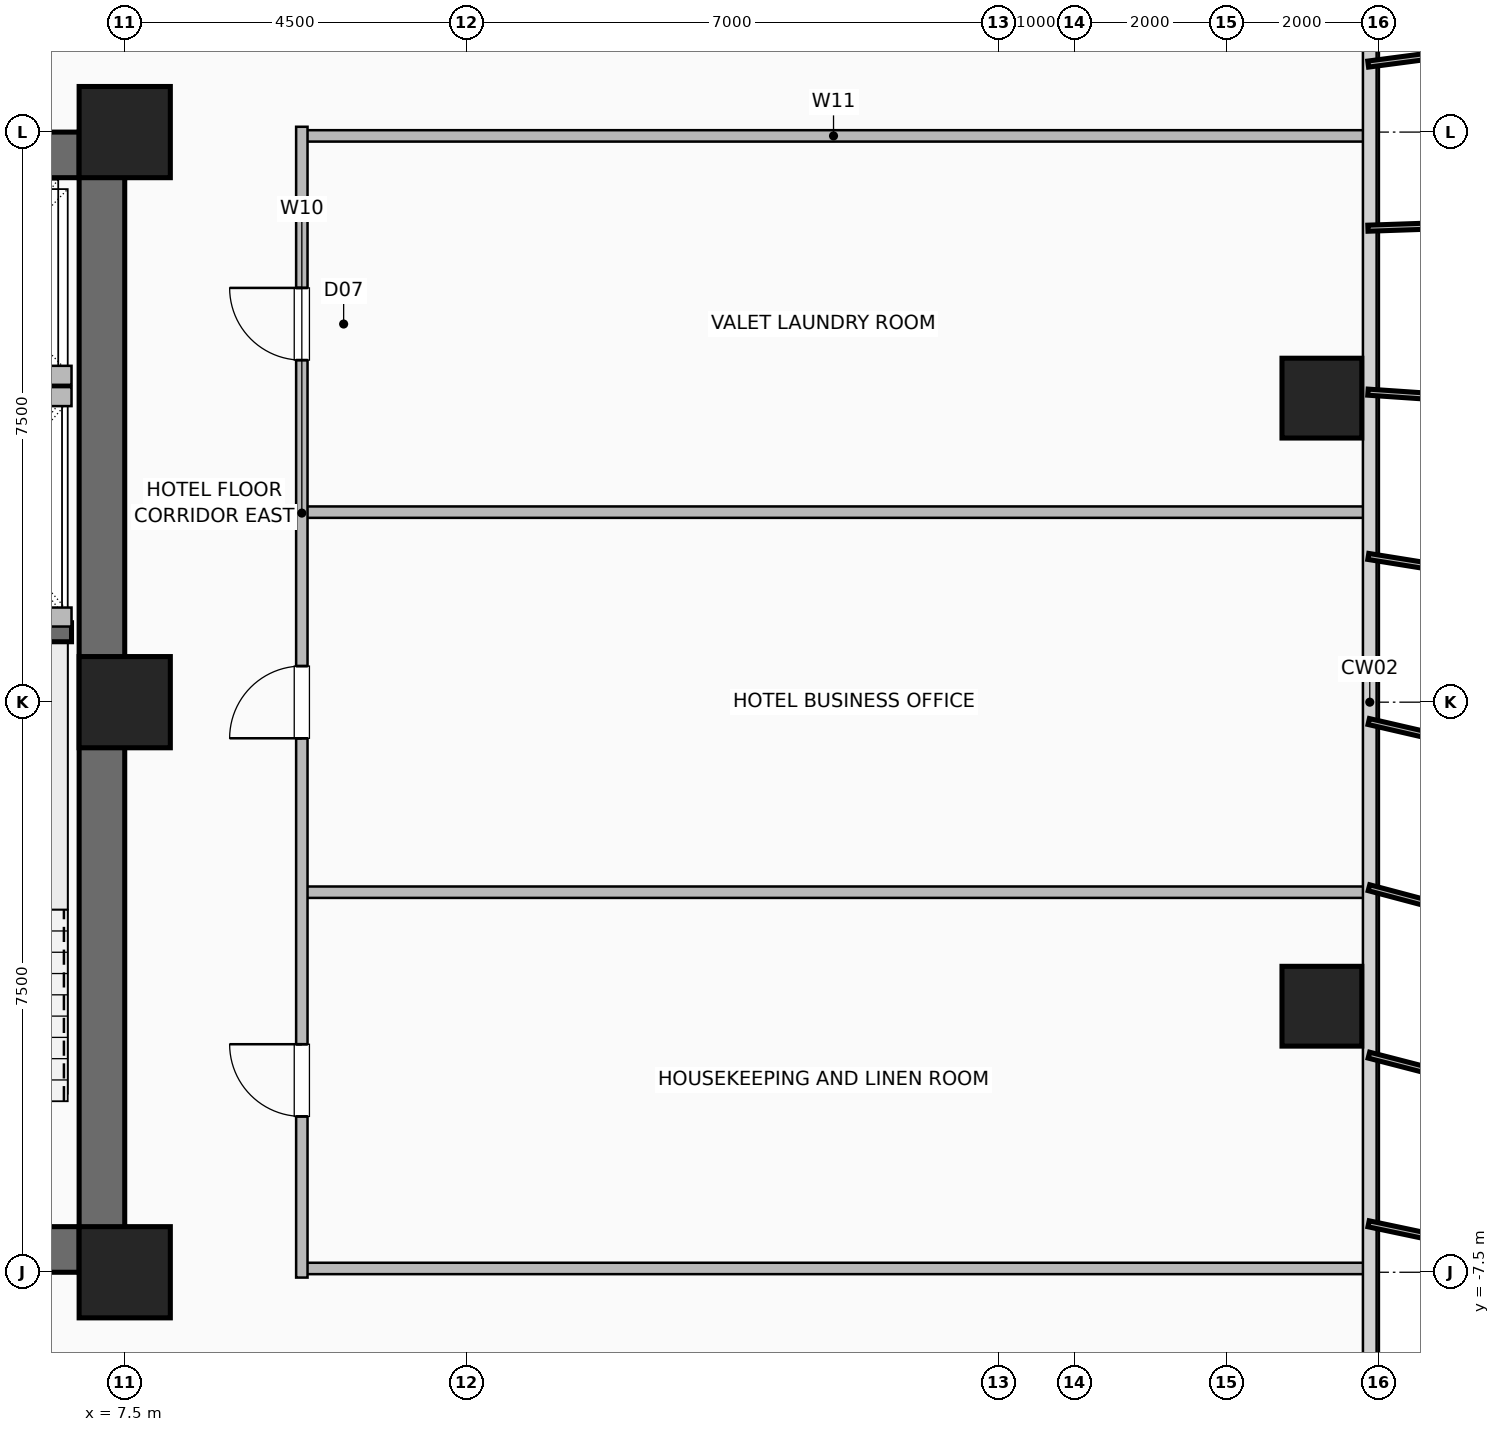
"""IFC4 building model, lengths in metres.
Left out: names, types, materials, properties, quantities, classifications, styles, units other than length and angle.
Written with IfcOpenShell. Run it as: python <this file> out.ifc"""

import sys

from ifc_helpers import new_model, si_unit, direction, frame, frame_2d, origin, origin_2d, place, context, subcontext, project, spatial, rectangle, hollow_rectangle, extrude, element, fill, save


model = new_model("IFC4")
c1 = context("Model", 3, precision=1e-05, world=origin(), true_north=direction((0.0, 1.0)))
c2 = subcontext(c1, "Body", "Model", "MODEL_VIEW")
j1 = project(units=[si_unit("LENGTHUNIT", "METRE"), si_unit("PLANEANGLEUNIT", "RADIAN")], contexts=[c1])
p1 = place(None, origin())
s1 = spatial("IfcSite", under=j1, at=p1, CompositionType="ELEMENT")
p2 = place(p1, origin())
s2 = spatial("IfcBuilding", under=s1, at=p2, CompositionType="ELEMENT")
p3 = place(p2, frame((0.0, 0.0, 37.5)))
s3 = spatial("IfcBuildingStorey", under=s2, at=p3, CompositionType="ELEMENT", Elevation=37.5)
for number, where, z_axis, x_axis in (
    (1, (7.5, -7.5, 0.0), (0.0, 0.0, 1.0), (1.0, 0.0, 0.0)),
    (2, (7.5, 0.0, 0.0), (0.0, 0.0, 1.0), (1.0, 0.0, 0.0)),
    (3, (7.5, 7.5, 0.0), (0.0, 0.0, 1.0), (1.0, 0.0, 0.0)),
):
    element("IfcColumn", number, at=place(p3, frame(where, z_axis=z_axis, x_axis=x_axis)), inside=s3, PredefinedType="COLUMN", context=c2, shape_type="SweptSolid", body=[
        extrude(hollow_rectangle(XDim=1.2, YDim=1.2, WallThickness=0.055, at=origin_2d()), origin(), (0.0, 0.0, 1.0), 3.5),
    ])
for number, where, z_axis, x_axis in (
    (4, (23.25, -4.0, 0.0), (0.0, 0.0, 1.0), (1.0, 0.0, 0.0)),
    (5, (23.25, 4.0, 0.0), (0.0, 0.0, 1.0), (1.0, 0.0, 0.0)),
):
    element("IfcColumn", number, at=place(p3, frame(where, z_axis=z_axis, x_axis=x_axis)), inside=s3, PredefinedType="COLUMN", context=c2, shape_type="SweptSolid", body=[
        extrude(hollow_rectangle(XDim=1.05, YDim=1.05, WallThickness=0.05, at=origin_2d()), origin(), (0.0, 0.0, 1.0), 3.5),
    ])
p4 = place(p3, frame((-7.5, -7.2, 0.0), z_axis=(0.0, 0.0, 1.0), x_axis=(1.0, 0.0, 0.0)))
e6 = element("IfcWall", 6, at=p4, inside=s3, PredefinedType="SHEAR", context=c2, shape_type="SweptSolid", body=[
    extrude(rectangle(XDim=15.0, YDim=0.6, at=frame_2d((7.5, 0.0))), origin(), (0.0, 0.0, 1.0), 3.25),
])
p5 = place(p4, frame((1.55, 0.0, 0.0)))
e7 = element("IfcOpeningElement", 7, at=p5, cuts=e6, PredefinedType="OPENING", context=c2, shape_type="SweptSolid", body=[
    extrude(rectangle(XDim=1.05, YDim=2.08, at=frame_2d((0.525, 1.04))), frame((0.0, 0.31, 0.0), z_axis=(0.0, -1.0, 0.0), x_axis=(1.0, 0.0, 0.0)), (0.0, 0.0, 1.0), 0.62),
])
p6 = place(p4, frame((12.4, 0.0, 0.0)))
e8 = element("IfcOpeningElement", 8, at=p6, cuts=e6, PredefinedType="OPENING", context=c2, shape_type="SweptSolid", body=[
    extrude(rectangle(XDim=1.05, YDim=2.08, at=frame_2d((0.525, 1.04))), frame((0.0, 0.31, 0.0), z_axis=(0.0, -1.0, 0.0), x_axis=(1.0, 0.0, 0.0)), (0.0, 0.0, 1.0), 0.62),
])
p7 = place(p4, frame((4.64, 0.0, 0.0)))
e9 = element("IfcOpeningElement", 9, at=p7, cuts=e6, PredefinedType="OPENING", context=c2, shape_type="SweptSolid", body=[
    extrude(rectangle(XDim=1.1, YDim=2.2, at=frame_2d((0.55, 1.1))), frame((0.0, 0.31, 0.0), z_axis=(0.0, -1.0, 0.0), x_axis=(1.0, 0.0, 0.0)), (0.0, 0.0, 1.0), 0.62),
])
p8 = place(p4, frame((6.52, 0.0, 0.0)))
e10 = element("IfcOpeningElement", 10, at=p8, cuts=e6, PredefinedType="OPENING", context=c2, shape_type="SweptSolid", body=[
    extrude(rectangle(XDim=1.1, YDim=2.2, at=frame_2d((0.55, 1.1))), frame((0.0, 0.31, 0.0), z_axis=(0.0, -1.0, 0.0), x_axis=(1.0, 0.0, 0.0)), (0.0, 0.0, 1.0), 0.62),
])
p9 = place(p4, frame((8.4, 0.0, 0.0)))
e11 = element("IfcOpeningElement", 11, at=p9, cuts=e6, PredefinedType="OPENING", context=c2, shape_type="SweptSolid", body=[
    extrude(rectangle(XDim=1.1, YDim=2.2, at=frame_2d((0.55, 1.1))), frame((0.0, 0.31, 0.0), z_axis=(0.0, -1.0, 0.0), x_axis=(1.0, 0.0, 0.0)), (0.0, 0.0, 1.0), 0.62),
])
for number, where, z_axis, x_axis in (
    (12, (-7.5, 7.2, 0.0), (0.0, 0.0, 1.0), (1.0, 0.0, 0.0)),
    (13, (7.2, -7.5, 0.0), (0.0, 0.0, 1.0), (0.0, 1.0, 0.0)),
):
    element("IfcWall", number, at=place(p3, frame(where, z_axis=z_axis, x_axis=x_axis)), inside=s3, PredefinedType="SHEAR", context=c2, shape_type="SweptSolid", body=[
        extrude(rectangle(XDim=15.0, YDim=0.6, at=frame_2d((7.5, 0.0))), origin(), (0.0, 0.0, 1.0), 3.25),
    ])
p10 = place(p3, frame((3.47, 0.92, 0.0), z_axis=(0.0, 0.0, 1.0), x_axis=(1.0, 0.0, 0.0)))
e14 = element("IfcWall", 14, at=p10, inside=s3, PredefinedType="SHEAR", context=c2, shape_type="SweptSolid", body=[
    extrude(rectangle(XDim=3.33, YDim=0.25, at=frame_2d((1.665, 0.0))), origin(), (0.0, 0.0, 1.0), 3.25),
])
p11 = place(p3, frame((4.38, 4.3, 0.0), z_axis=(0.0, 0.0, 1.0), x_axis=(1.0, 0.0, 0.0)))
e15 = element("IfcWall", 15, at=p11, inside=s3, PredefinedType="SHEAR", context=c2, shape_type="SweptSolid", body=[
    extrude(rectangle(XDim=2.42, YDim=0.25, at=frame_2d((1.21, 0.0))), origin(), (0.0, 0.0, 1.0), 3.25),
])
for number, where, z_axis, x_axis in (
    (16, (4.28, 1.12, 0.0), (0.0, 0.0, 1.0), (1.0, 0.0, 0.0)),
    (17, (4.28, 4.02, 0.0), (0.0, 0.0, 1.0), (1.0, 0.0, 0.0)),
):
    element("IfcWall", number, at=place(p3, frame(where, z_axis=z_axis, x_axis=x_axis)), inside=s3, PredefinedType="SHEAR", context=c2, shape_type="SweptSolid", body=[
        extrude(rectangle(XDim=2.52, YDim=0.25, at=frame_2d((1.26, 0.0))), origin(), (0.0, 0.0, 1.0), 3.25),
    ])
for number, where, z_axis, x_axis in (
    (18, (9.83, -7.45, 0.0), (0.0, 0.0, 1.0), (1.0, 0.0, 0.0)),
    (19, (9.83, -2.5, 0.0), (0.0, 0.0, 1.0), (1.0, 0.0, 0.0)),
    (20, (9.83, 2.5, 0.0), (0.0, 0.0, 1.0), (1.0, 0.0, 0.0)),
    (21, (9.83, 7.45, 0.0), (0.0, 0.0, 1.0), (1.0, 0.0, 0.0)),
):
    element("IfcWall", number, at=place(p3, frame(where, z_axis=z_axis, x_axis=x_axis)), inside=s3, PredefinedType="PARTITIONING", context=c2, shape_type="SweptSolid", body=[
        extrude(rectangle(XDim=13.99, YDim=0.15, at=frame_2d((6.995, 0.0))), origin(), (0.0, 0.0, 1.0), 3.25),
    ])
p12 = place(p3, frame((9.83, -7.57, 0.0), z_axis=(0.0, 0.0, 1.0), x_axis=(0.0, 1.0, 0.0)))
e22 = element("IfcWall", 22, at=p12, inside=s3, PredefinedType="PARTITIONING", context=c2, shape_type="SweptSolid", body=[
    extrude(rectangle(XDim=15.14, YDim=0.15, at=frame_2d((7.57, 0.0))), origin(), (0.0, 0.0, 1.0), 3.25),
])
p13 = place(p12, frame((2.12, 0.0, 0.0)))
e23 = element("IfcOpeningElement", 23, at=p13, cuts=e22, PredefinedType="OPENING", context=c2, shape_type="SweptSolid", body=[
    extrude(rectangle(XDim=0.95, YDim=2.06, at=frame_2d((0.475, 1.03))), frame((0.0, 0.085, 0.0), z_axis=(0.0, -1.0, 0.0), x_axis=(1.0, 0.0, 0.0)), (0.0, 0.0, 1.0), 0.17),
])
p14 = place(p12, frame((7.095, 0.0, 0.0)))
e24 = element("IfcOpeningElement", 24, at=p14, cuts=e22, PredefinedType="OPENING", context=c2, shape_type="SweptSolid", body=[
    extrude(rectangle(XDim=0.95, YDim=2.06, at=frame_2d((0.475, 1.03))), frame((0.0, 0.085, 0.0), z_axis=(0.0, -1.0, 0.0), x_axis=(1.0, 0.0, 0.0)), (0.0, 0.0, 1.0), 0.17),
])
p15 = place(p12, frame((12.07, 0.0, 0.0)))
e25 = element("IfcOpeningElement", 25, at=p15, cuts=e22, PredefinedType="OPENING", context=c2, shape_type="SweptSolid", body=[
    extrude(rectangle(XDim=0.95, YDim=2.06, at=frame_2d((0.475, 1.03))), frame((0.0, 0.085, 0.0), z_axis=(0.0, -1.0, 0.0), x_axis=(1.0, 0.0, 0.0)), (0.0, 0.0, 1.0), 0.17),
])
p16 = place(p13, origin())
e26 = element("IfcDoor", 26, at=p16, inside=s3, OperationType="SINGLE_SWING_RIGHT", PredefinedType="DOOR", context=c2, shape_type="SweptSolid", body=[
    extrude(rectangle(XDim=0.95, YDim=2.06, at=frame_2d((0.475, 1.03))), frame((0.0, 0.025, 0.0), z_axis=(0.0, -1.0, 0.0), x_axis=(1.0, 0.0, 0.0)), (0.0, 0.0, 1.0), 0.05),
])
fill(e23, e26)
p17 = place(p14, origin())
e27 = element("IfcDoor", 27, at=p17, inside=s3, OperationType="SINGLE_SWING_LEFT", PredefinedType="DOOR", context=c2, shape_type="SweptSolid", body=[
    extrude(rectangle(XDim=0.95, YDim=2.06, at=frame_2d((0.475, 1.03))), frame((0.0, 0.025, 0.0), z_axis=(0.0, -1.0, 0.0), x_axis=(1.0, 0.0, 0.0)), (0.0, 0.0, 1.0), 0.05),
])
fill(e24, e27)
p18 = place(p15, origin())
e28 = element("IfcDoor", 28, at=p18, inside=s3, OperationType="SINGLE_SWING_RIGHT", PredefinedType="DOOR", context=c2, shape_type="SweptSolid", body=[
    extrude(rectangle(XDim=0.95, YDim=2.06, at=frame_2d((0.475, 1.03))), frame((0.0, 0.025, 0.0), z_axis=(0.0, -1.0, 0.0), x_axis=(1.0, 0.0, 0.0)), (0.0, 0.0, 1.0), 0.05),
])
fill(e25, e28)
save(model, sys.argv[1])
